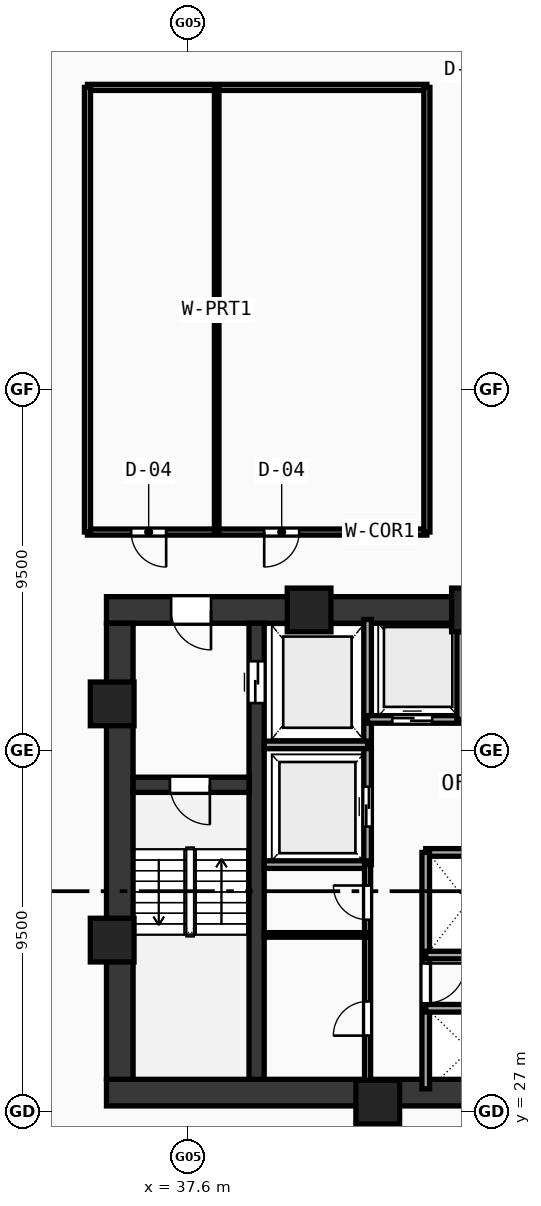
"""IFC4 building model, lengths in metres.
Left out: names, types, materials, properties, quantities, classifications, styles, units other than length and angle.
Written with IfcOpenShell. Run it as: python <this file> out.ifc"""

import sys

from ifc_helpers import new_model, si_unit, direction, frame, frame_2d, origin, origin_with_axes, origin_2d, place, context, subcontext, project, spatial, rectangle, hollow_rectangle, extrude, source, transform, mapped, element, fill, save


model = new_model("IFC4")
c1 = context("Model", 3, precision=1e-05, world=origin(), true_north=direction((0.0, 1.0)))
c2 = subcontext(c1, "Body", "Model", "MODEL_VIEW")
j1 = project(units=[si_unit("LENGTHUNIT", "METRE"), si_unit("PLANEANGLEUNIT", "RADIAN")], contexts=[c1])
p1 = place(None, origin())
s1 = spatial("IfcSite", under=j1, at=p1, CompositionType="ELEMENT")
p2 = place(p1, origin())
s2 = spatial("IfcBuilding", under=s1, at=p2, CompositionType="ELEMENT")
p3 = place(p2, frame((0.0, 0.0, 70.33)))
s3 = spatial("IfcBuildingStorey", under=s2, at=p3, CompositionType="ELEMENT", Elevation=70.33)
p4 = place(p3, frame((35.45, 27.5, 0.0), z_axis=(0.0, 0.0, 1.0), x_axis=(1.0, 0.0, 0.0)))
e1 = element("IfcWall", 1, at=p4, inside=s3, PredefinedType="SHEAR", context=c2, shape_type="SweptSolid", body=[
    extrude(rectangle(XDim=25.1, YDim=0.7, at=frame_2d((12.55, 0.0))), origin(), (0.0, 0.0, 1.0), 5.77),
])
p5 = place(p3, frame((35.45, 40.2, 0.0), z_axis=(0.0, 0.0, 1.0), x_axis=(1.0, 0.0, 0.0)))
e2 = element("IfcWall", 2, at=p5, inside=s3, PredefinedType="SHEAR", context=c2, shape_type="SweptSolid", body=[
    extrude(rectangle(XDim=11.35, YDim=0.7, at=frame_2d((5.675, 0.0))), origin(), (0.0, 0.0, 1.0), 5.77),
])
p6 = place(p5, frame((1.7, 0.0, 0.0)))
e3 = element("IfcOpeningElement", 3, at=p6, cuts=e2, PredefinedType="OPENING", context=c2, shape_type="SweptSolid", body=[
    extrude(rectangle(XDim=1.05, YDim=2.1, at=frame_2d((0.525, 1.05))), frame((0.0, 0.36, 0.0), z_axis=(0.0, -1.0, 0.0), x_axis=(1.0, 0.0, 0.0)), (0.0, 0.0, 1.0), 0.72),
])
p7 = place(p3, frame((35.8, 27.85, 0.0), z_axis=(0.0, 0.0, 1.0), x_axis=(0.0, 1.0, 0.0)))
e4 = element("IfcWall", 4, at=p7, inside=s3, PredefinedType="SHEAR", context=c2, shape_type="SweptSolid", body=[
    extrude(rectangle(XDim=12.0, YDim=0.7, at=frame_2d((6.0, 0.0))), origin(), (0.0, 0.0, 1.0), 5.77),
])
p8 = place(p3, frame((39.4, 27.85, 0.0), z_axis=(0.0, 0.0, 1.0), x_axis=(0.0, 1.0, 0.0)))
e5 = element("IfcWall", 5, at=p8, inside=s3, PredefinedType="SHEAR", context=c2, shape_type="SweptSolid", body=[
    extrude(rectangle(XDim=12.0, YDim=0.4, at=frame_2d((6.0, 0.0))), origin(), (0.0, 0.0, 1.0), 5.77),
])
p9 = place(p8, frame((9.9, 0.0, 0.0)))
e6 = element("IfcOpeningElement", 6, at=p9, cuts=e5, PredefinedType="OPENING", context=c2, shape_type="SweptSolid", body=[
    extrude(rectangle(XDim=1.1, YDim=2.1, at=frame_2d((0.55, 1.05))), frame((0.0, 0.21, 0.0), z_axis=(0.0, -1.0, 0.0), x_axis=(1.0, 0.0, 0.0)), (0.0, 0.0, 1.0), 0.42),
])
p10 = place(p3, frame((36.15, 35.6, 0.0), z_axis=(0.0, 0.0, 1.0), x_axis=(1.0, 0.0, 0.0)))
e7 = element("IfcWall", 7, at=p10, inside=s3, PredefinedType="SHEAR", context=c2, shape_type="SweptSolid", body=[
    extrude(rectangle(XDim=3.05, YDim=0.4, at=frame_2d((1.525, 0.0))), origin(), (0.0, 0.0, 1.0), 5.77),
])
p11 = place(p10, frame((0.97, 0.0, 0.0)))
e8 = element("IfcOpeningElement", 8, at=p11, cuts=e7, PredefinedType="OPENING", context=c2, shape_type="SweptSolid", body=[
    extrude(rectangle(XDim=1.05, YDim=2.1, at=frame_2d((0.525, 1.05))), frame((0.0, 0.21, 0.0), z_axis=(0.0, -1.0, 0.0), x_axis=(1.0, 0.0, 0.0)), (0.0, 0.0, 1.0), 0.42),
])
m1 = source(origin(), c2, "Body", "SweptSolid", [
    extrude(hollow_rectangle(XDim=1.15, YDim=1.15, WallThickness=0.048, at=origin_2d()), origin(), (0.0, 0.0, 1.0), 6.03),
])
for number, where, z_axis, x_axis in (
    (9, (42.588, 27.25, -0.26), (0.0, 0.0, 1.0), (1.0, 0.0, 0.0)),
    (10, (45.106, 40.2, -0.26), (0.0, 0.0, 1.0), (1.0, 0.0, 0.0)),
    (11, (40.781, 40.2, -0.26), (0.0, 0.0, 1.0), (1.0, 0.0, 0.0)),
    (12, (35.6, 37.729, -0.26), (0.0, 0.0, 1.0), (1.0, 0.0, 0.0)),
    (13, (35.6, 31.513, -0.26), (0.0, 0.0, 1.0), (1.0, 0.0, 0.0)),
):
    element("IfcColumn", number, at=place(p3, frame(where, z_axis=z_axis, x_axis=x_axis)), inside=s3, PredefinedType="COLUMN", context=c2, shape_type="MappedRepresentation", body=[
        mapped(m1, transform((0.0, 0.0, 0.0), scale=1.0)),
    ])
p12 = place(p3, frame((42.32, 33.5, 0.0), z_axis=(0.0, 0.0, 1.0), x_axis=(0.0, 1.0, 0.0)))
e14 = element("IfcWall", 14, at=p12, inside=s3, PredefinedType="SOLIDWALL", context=c2, shape_type="SweptSolid", body=[
    extrude(rectangle(XDim=6.45, YDim=0.2, at=frame_2d((3.225, 0.0))), origin(), (0.0, 0.0, 1.0), 5.77),
])
p13 = place(p12, frame((1.0, 0.0, 0.0)))
e15 = element("IfcOpeningElement", 15, at=p13, cuts=e14, PredefinedType="OPENING", context=c2, shape_type="SweptSolid", body=[
    extrude(rectangle(XDim=1.05, YDim=2.1, at=frame_2d((0.525, 1.05))), frame((0.0, 0.11, 0.0), z_axis=(0.0, -1.0, 0.0), x_axis=(1.0, 0.0, 0.0)), (0.0, 0.0, 1.0), 0.22),
])
for number, where, z_axis, x_axis in (
    (16, (39.6, 36.65, 0.0), (0.0, 0.0, 1.0), (1.0, 0.0, 0.0)),
    (17, (39.6, 33.5, 0.0), (0.0, 0.0, 1.0), (1.0, 0.0, 0.0)),
):
    element("IfcWall", number, at=place(p3, frame(where, z_axis=z_axis, x_axis=x_axis)), inside=s3, PredefinedType="SOLIDWALL", context=c2, shape_type="SweptSolid", body=[
        extrude(rectangle(XDim=2.72, YDim=0.2, at=frame_2d((1.36, 0.0))), origin(), (0.0, 0.0, 1.0), 5.77),
    ])
p14 = place(p3, frame((42.32, 37.32, 0.0), z_axis=(0.0, 0.0, 1.0), x_axis=(1.0, 0.0, 0.0)))
e18 = element("IfcWall", 18, at=p14, inside=s3, PredefinedType="SOLIDWALL", context=c2, shape_type="SweptSolid", body=[
    extrude(rectangle(XDim=4.73, YDim=0.2, at=frame_2d((2.365, 0.0))), origin(), (0.0, 0.0, 1.0), 5.77),
])
p15 = place(p14, frame((0.65, 0.0, 0.0)))
e19 = element("IfcOpeningElement", 19, at=p15, cuts=e18, PredefinedType="OPENING", context=c2, shape_type="SweptSolid", body=[
    extrude(rectangle(XDim=1.05, YDim=2.1, at=frame_2d((0.525, 1.05))), frame((0.0, 0.11, 0.0), z_axis=(0.0, -1.0, 0.0), x_axis=(1.0, 0.0, 0.0)), (0.0, 0.0, 1.0), 0.22),
])
p16 = place(p14, frame((2.95, 0.0, 0.0)))
e20 = element("IfcOpeningElement", 20, at=p16, cuts=e18, PredefinedType="OPENING", context=c2, shape_type="SweptSolid", body=[
    extrude(rectangle(XDim=1.05, YDim=2.1, at=frame_2d((0.525, 1.05))), frame((0.0, 0.11, 0.0), z_axis=(0.0, -1.0, 0.0), x_axis=(1.0, 0.0, 0.0)), (0.0, 0.0, 1.0), 0.22),
])
p17 = place(p3, frame((44.77, 37.32, 0.0), z_axis=(0.0, 0.0, 1.0), x_axis=(0.0, 1.0, 0.0)))
e21 = element("IfcWall", 21, at=p17, inside=s3, PredefinedType="SOLIDWALL", context=c2, shape_type="SweptSolid", body=[
    extrude(rectangle(XDim=2.63, YDim=0.2, at=frame_2d((1.315, 0.0))), origin(), (0.0, 0.0, 1.0), 2.42),
])
p18 = place(p3, frame((43.85, 33.82, 0.0), z_axis=(0.0, 0.0, 1.0), x_axis=(1.0, 0.0, 0.0)))
e22 = element("IfcWall", 22, at=p18, inside=s3, PredefinedType="SOLIDWALL", context=c2, shape_type="SweptSolid", body=[
    extrude(rectangle(XDim=9.83, YDim=0.2, at=frame_2d((4.915, 0.0))), origin(), (0.0, 0.0, 1.0), 5.77),
])
p19 = place(p3, frame((43.85, 27.6, 0.0), z_axis=(0.0, 0.0, 1.0), x_axis=(0.0, 1.0, 0.0)))
e23 = element("IfcWall", 23, at=p19, inside=s3, PredefinedType="SOLIDWALL", context=c2, shape_type="SweptSolid", body=[
    extrude(rectangle(XDim=6.22, YDim=0.2, at=frame_2d((3.11, 0.0))), origin(), (0.0, 0.0, 1.0), 5.77),
])
p20 = place(p19, frame((2.25, 0.0, 0.0)))
e24 = element("IfcOpeningElement", 24, at=p20, cuts=e23, PredefinedType="OPENING", context=c2, shape_type="SweptSolid", body=[
    extrude(rectangle(XDim=1.05, YDim=2.1, at=frame_2d((0.525, 1.05))), frame((0.0, 0.11, 0.0), z_axis=(0.0, -1.0, 0.0), x_axis=(1.0, 0.0, 0.0)), (0.0, 0.0, 1.0), 0.22),
])
p21 = place(p3, frame((43.85, 29.72, 0.0), z_axis=(0.0, 0.0, 1.0), x_axis=(1.0, 0.0, 0.0)))
e25 = element("IfcWall", 25, at=p21, inside=s3, PredefinedType="SOLIDWALL", context=c2, shape_type="SweptSolid", body=[
    extrude(rectangle(XDim=7.2, YDim=0.2, at=frame_2d((3.6, 0.0))), origin(), (0.0, 0.0, 1.0), 5.77),
])
p22 = place(p3, frame((43.85, 31.12, 0.0), z_axis=(0.0, 0.0, 1.0), x_axis=(1.0, 0.0, 0.0)))
e26 = element("IfcWall", 26, at=p22, inside=s3, PredefinedType="SOLIDWALL", context=c2, shape_type="SweptSolid", body=[
    extrude(rectangle(XDim=9.83, YDim=0.2, at=frame_2d((4.915, 0.0))), origin(), (0.0, 0.0, 1.0), 5.77),
])
p23 = place(p3, frame((42.32, 27.6, 0.0), z_axis=(0.0, 0.0, 1.0), x_axis=(0.0, 1.0, 0.0)))
e27 = element("IfcWall", 27, at=p23, inside=s3, PredefinedType="PARTITIONING", context=c2, shape_type="SweptSolid", body=[
    extrude(rectangle(XDim=5.9, YDim=0.16, at=frame_2d((2.95, 0.0))), origin(), (0.0, 0.0, 1.0), 2.42),
])
p24 = place(p23, frame((1.4, 0.0, 0.0)))
e28 = element("IfcOpeningElement", 28, at=p24, cuts=e27, PredefinedType="OPENING", context=c2, shape_type="SweptSolid", body=[
    extrude(rectangle(XDim=0.9, YDim=2.1, at=frame_2d((0.45, 1.05))), frame((0.0, 0.09, 0.0), z_axis=(0.0, -1.0, 0.0), x_axis=(1.0, 0.0, 0.0)), (0.0, 0.0, 1.0), 0.18),
])
p25 = place(p23, frame((4.45, 0.0, 0.0)))
e29 = element("IfcOpeningElement", 29, at=p25, cuts=e27, PredefinedType="OPENING", context=c2, shape_type="SweptSolid", body=[
    extrude(rectangle(XDim=0.9, YDim=2.1, at=frame_2d((0.45, 1.05))), frame((0.0, 0.09, 0.0), z_axis=(0.0, -1.0, 0.0), x_axis=(1.0, 0.0, 0.0)), (0.0, 0.0, 1.0), 0.18),
])
p26 = place(p3, frame((39.6, 31.65, 0.0), z_axis=(0.0, 0.0, 1.0), x_axis=(1.0, 0.0, 0.0)))
e30 = element("IfcWall", 30, at=p26, inside=s3, PredefinedType="PARTITIONING", context=c2, shape_type="SweptSolid", body=[
    extrude(rectangle(XDim=2.72, YDim=0.12, at=frame_2d((1.36, 0.0))), origin(), (0.0, 0.0, 1.0), 5.77),
])
p27 = place(p3, frame((34.95, 42.25, 0.0), z_axis=(0.0, 0.0, 1.0), x_axis=(1.0, 0.0, 0.0)))
e31 = element("IfcWall", 31, at=p27, inside=s3, PredefinedType="PARTITIONING", context=c2, shape_type="SweptSolid", body=[
    extrude(rectangle(XDim=8.93, YDim=0.16, at=frame_2d((4.465, 0.0))), origin(), (0.0, 0.0, 1.0), 2.42),
])
p28 = place(p27, frame((1.15, 0.0, 0.0)))
e32 = element("IfcOpeningElement", 32, at=p28, cuts=e31, PredefinedType="OPENING", context=c2, shape_type="SweptSolid", body=[
    extrude(rectangle(XDim=0.92, YDim=2.1, at=frame_2d((0.46, 1.05))), frame((0.0, 0.09, 0.0), z_axis=(0.0, -1.0, 0.0), x_axis=(1.0, 0.0, 0.0)), (0.0, 0.0, 1.0), 0.18),
])
p29 = place(p27, frame((4.65, 0.0, 0.0)))
e33 = element("IfcOpeningElement", 33, at=p29, cuts=e31, PredefinedType="OPENING", context=c2, shape_type="SweptSolid", body=[
    extrude(rectangle(XDim=0.92, YDim=2.1, at=frame_2d((0.46, 1.05))), frame((0.0, 0.09, 0.0), z_axis=(0.0, -1.0, 0.0), x_axis=(1.0, 0.0, 0.0)), (0.0, 0.0, 1.0), 0.18),
])
p30 = place(p3, frame((34.95, 53.95, 0.0), z_axis=(0.0, 0.0, 1.0), x_axis=(1.0, 0.0, 0.0)))
e34 = element("IfcWall", 34, at=p30, inside=s3, PredefinedType="PARTITIONING", context=c2, shape_type="SweptSolid", body=[
    extrude(rectangle(XDim=8.93, YDim=0.16, at=frame_2d((4.465, 0.0))), origin(), (0.0, 0.0, 1.0), 2.42),
])
for number, where, z_axis, x_axis in (
    (35, (34.95, 42.25, 0.0), (0.0, 0.0, 1.0), (0.0, 1.0, 0.0)),
    (36, (43.88, 42.25, 0.0), (0.0, 0.0, 1.0), (0.0, 1.0, 0.0)),
):
    element("IfcWall", number, at=place(p3, frame(where, z_axis=z_axis, x_axis=x_axis)), inside=s3, PredefinedType="PARTITIONING", context=c2, shape_type="SweptSolid", body=[
        extrude(rectangle(XDim=11.7, YDim=0.16, at=frame_2d((5.85, 0.0))), origin(), (0.0, 0.0, 1.0), 2.42),
    ])
p31 = place(p3, frame((38.35, 42.25, 0.0), z_axis=(0.0, 0.0, 1.0), x_axis=(0.0, 1.0, 0.0)))
e37 = element("IfcWall", 37, at=p31, inside=s3, PredefinedType="PARTITIONING", context=c2, shape_type="SweptSolid", body=[
    extrude(rectangle(XDim=11.7, YDim=0.12, at=frame_2d((5.85, 0.0))), origin(), (0.0, 0.0, 1.0), 2.42),
])
m2 = source(origin(), c2, "Body", "SweptSolid", [
    extrude(rectangle(XDim=1.05, YDim=2.1, at=frame_2d((0.525, 1.05))), frame((0.0, 0.025, 0.0), z_axis=(0.0, -1.0, 0.0), x_axis=(1.0, 0.0, 0.0)), (0.0, 0.0, 1.0), 0.05),
])
p32 = place(p11, frame((1.05, 0.0, 0.0), z_axis=(0.0, 0.0, 1.0), x_axis=(-1.0, 0.0, 0.0)))
e38 = element("IfcDoor", 38, at=p32, inside=s3, OperationType="SINGLE_SWING_LEFT", PredefinedType="DOOR", context=c2, shape_type="MappedRepresentation", body=[
    mapped(m2, transform((0.0, 0.0, 0.0), scale=1.0)),
])
fill(e8, e38)
p33 = place(p6, frame((1.05, 0.0, 0.0), z_axis=(0.0, 0.0, 1.0), x_axis=(-1.0, 0.0, 0.0)))
e39 = element("IfcDoor", 39, at=p33, inside=s3, OperationType="SINGLE_SWING_LEFT", PredefinedType="DOOR", context=c2, shape_type="MappedRepresentation", body=[
    mapped(m2, transform((0.0, 0.0, 0.0), scale=1.0)),
])
fill(e3, e39)
m3 = source(origin(), c2, "Body", "SweptSolid", [
    extrude(rectangle(XDim=1.1, YDim=2.1, at=frame_2d((0.55, 1.05))), frame((0.0, 0.025, 0.0), z_axis=(0.0, -1.0, 0.0), x_axis=(1.0, 0.0, 0.0)), (0.0, 0.0, 1.0), 0.05),
])
p34 = place(p9, frame((1.1, 0.0, 0.0), z_axis=(0.0, 0.0, 1.0), x_axis=(-1.0, 0.0, 0.0)))
e40 = element("IfcDoor", 40, at=p34, inside=s3, OperationType="DOUBLE_DOOR_SLIDING", PredefinedType="DOOR", context=c2, shape_type="MappedRepresentation", body=[
    mapped(m3, transform((0.0, 0.0, 0.0), scale=1.0)),
])
fill(e6, e40)
p35 = place(p13, origin_with_axes())
e41 = element("IfcDoor", 41, at=p35, inside=s3, OperationType="DOUBLE_DOOR_SLIDING", PredefinedType="DOOR", context=c2, shape_type="MappedRepresentation", body=[
    mapped(m2, transform((0.0, 0.0, 0.0), scale=1.0)),
])
fill(e15, e41)
p36 = place(p15, frame((1.05, 0.0, 0.0), z_axis=(0.0, 0.0, 1.0), x_axis=(-1.0, 0.0, 0.0)))
e42 = element("IfcDoor", 42, at=p36, inside=s3, OperationType="DOUBLE_DOOR_SLIDING", PredefinedType="DOOR", context=c2, shape_type="MappedRepresentation", body=[
    mapped(m2, transform((0.0, 0.0, 0.0), scale=1.0)),
])
fill(e19, e42)
p37 = place(p20, frame((1.05, 0.0, 0.0), z_axis=(0.0, 0.0, 1.0), x_axis=(-1.0, 0.0, 0.0)))
e43 = element("IfcDoor", 43, at=p37, inside=s3, OperationType="SINGLE_SWING_LEFT", PredefinedType="DOOR", context=c2, shape_type="MappedRepresentation", body=[
    mapped(m2, transform((0.0, 0.0, 0.0), scale=1.0)),
])
fill(e24, e43)
m4 = source(origin(), c2, "Body", "SweptSolid", [
    extrude(rectangle(XDim=0.9, YDim=2.1, at=frame_2d((0.45, 1.05))), frame((0.0, 0.025, 0.0), z_axis=(0.0, -1.0, 0.0), x_axis=(1.0, 0.0, 0.0)), (0.0, 0.0, 1.0), 0.05),
])
p38 = place(p24, origin_with_axes())
e44 = element("IfcDoor", 44, at=p38, inside=s3, OperationType="SINGLE_SWING_LEFT", PredefinedType="DOOR", context=c2, shape_type="MappedRepresentation", body=[
    mapped(m4, transform((0.0, 0.0, 0.0), scale=1.0)),
])
fill(e28, e44)
p39 = place(p25, origin_with_axes())
e45 = element("IfcDoor", 45, at=p39, inside=s3, OperationType="SINGLE_SWING_RIGHT", PredefinedType="DOOR", context=c2, shape_type="MappedRepresentation", body=[
    mapped(m4, transform((0.0, 0.0, 0.0), scale=1.0)),
])
fill(e29, e45)
m5 = source(origin(), c2, "Body", "SweptSolid", [
    extrude(rectangle(XDim=0.92, YDim=2.1, at=frame_2d((0.46, 1.05))), frame((0.0, 0.025, 0.0), z_axis=(0.0, -1.0, 0.0), x_axis=(1.0, 0.0, 0.0)), (0.0, 0.0, 1.0), 0.05),
])
p40 = place(p28, frame((0.92, 0.0, 0.0), z_axis=(0.0, 0.0, 1.0), x_axis=(-1.0, 0.0, 0.0)))
e46 = element("IfcDoor", 46, at=p40, inside=s3, OperationType="SINGLE_SWING_LEFT", PredefinedType="DOOR", context=c2, shape_type="MappedRepresentation", body=[
    mapped(m5, transform((0.0, 0.0, 0.0), scale=1.0)),
])
fill(e32, e46)
p41 = place(p29, frame((0.92, 0.0, 0.0), z_axis=(0.0, 0.0, 1.0), x_axis=(-1.0, 0.0, 0.0)))
e47 = element("IfcDoor", 47, at=p41, inside=s3, OperationType="SINGLE_SWING_RIGHT", PredefinedType="DOOR", context=c2, shape_type="MappedRepresentation", body=[
    mapped(m5, transform((0.0, 0.0, 0.0), scale=1.0)),
])
fill(e33, e47)
save(model, sys.argv[1])
